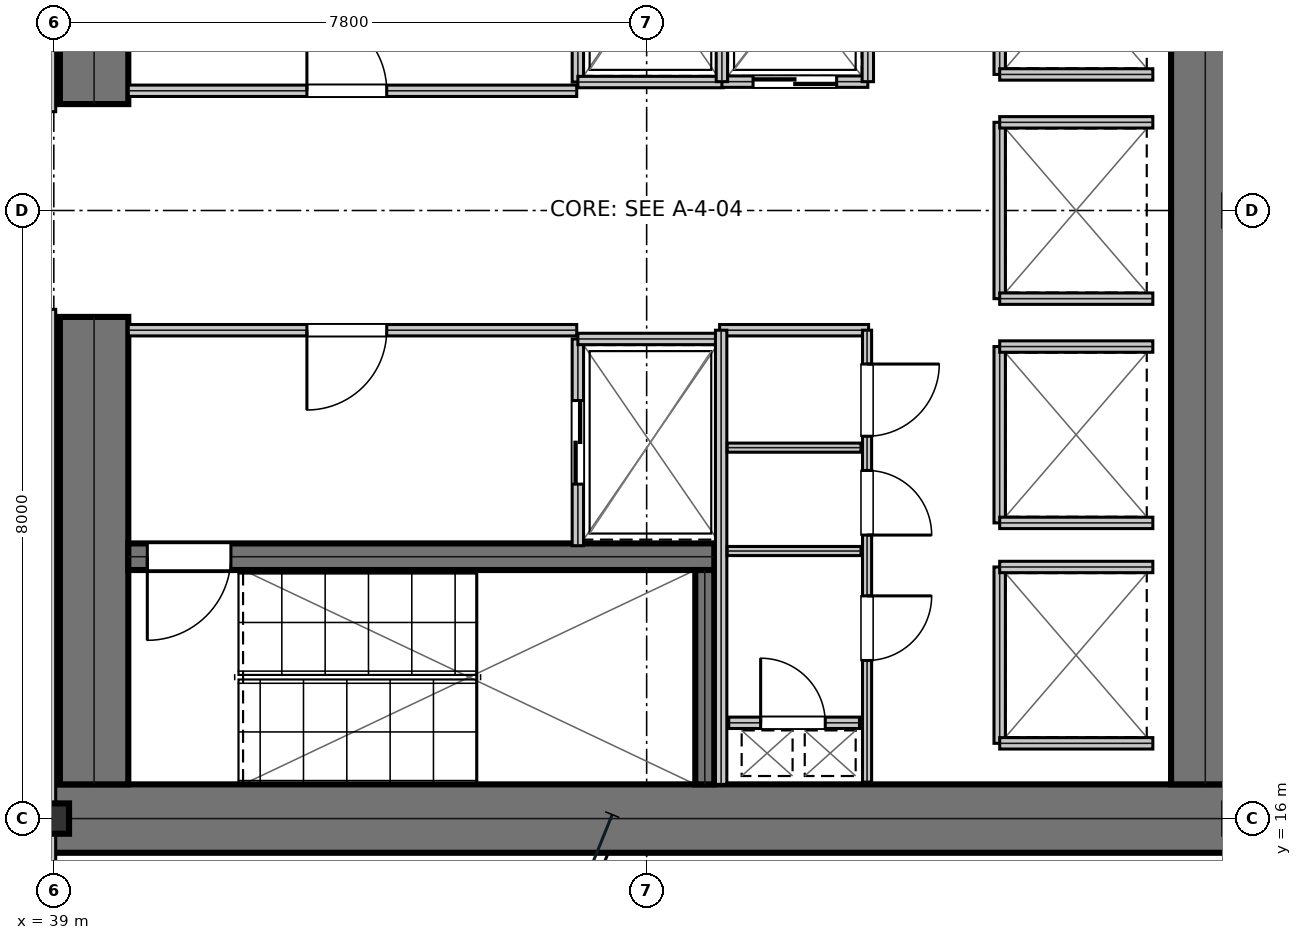
"""IFC4 building model, lengths in metres.
Left out: names, types, materials, properties, quantities, classifications, styles, units other than length and angle.
Written with IfcOpenShell. Run it as: python <this file> out.ifc"""

import sys

from ifc_helpers import new_model, si_unit, direction, frame, frame_2d, origin, origin_2d, place, context, subcontext, project, spatial, rectangle, i_section, extrude, element, fill, save


model = new_model("IFC4")
c1 = context("Model", 3, precision=1e-05, world=origin(), true_north=direction((0.0, 1.0)))
c2 = subcontext(c1, "Body", "Model", "MODEL_VIEW")
j1 = project(units=[si_unit("LENGTHUNIT", "METRE"), si_unit("PLANEANGLEUNIT", "RADIAN")], contexts=[c1])
p1 = place(None, origin())
s1 = spatial("IfcSite", under=j1, at=p1, CompositionType="ELEMENT")
p2 = place(p1, origin())
s2 = spatial("IfcBuilding", under=s1, at=p2, CompositionType="ELEMENT")
p3 = place(p2, frame((0.0, 0.0, 66.15)))
s3 = spatial("IfcBuildingStorey", under=s2, at=p3, CompositionType="ELEMENT", Elevation=66.15)
p4 = place(p3, frame((38.8, 16.0, 0.0), z_axis=(0.0, 0.0, 1.0), x_axis=(1.0, 0.0, 0.0)))
e1 = element("IfcWall", 1, at=p4, inside=s3, PredefinedType="SHEAR", context=c2, shape_type="SweptSolid", body=[
    extrude(rectangle(XDim=16.0, YDim=0.9, at=frame_2d((8.0, 0.0))), origin(), (0.0, 0.0, 1.0), 3.81),
])
for number, where, z_axis, x_axis in (
    (2, (39.53, 16.45, 0.0), (0.0, 0.0, 1.0), (0.0, 1.0, 0.0)),
    (3, (39.53, 25.4, 0.0), (0.0, 0.0, 1.0), (0.0, 1.0, 0.0)),
):
    element("IfcWall", number, at=place(p3, frame(where, z_axis=z_axis, x_axis=x_axis)), inside=s3, PredefinedType="SHEAR", context=c2, shape_type="SweptSolid", body=[
        extrude(rectangle(XDim=6.15, YDim=0.9, at=frame_2d((3.075, 0.0))), origin(), (0.0, 0.0, 1.0), 3.81),
    ])
p5 = place(p3, frame((54.15, 16.45, 0.0), z_axis=(0.0, 0.0, 1.0), x_axis=(0.0, 1.0, 0.0)))
e4 = element("IfcWall", 4, at=p5, inside=s3, PredefinedType="SHEAR", context=c2, shape_type="SweptSolid", body=[
    extrude(rectangle(XDim=15.1, YDim=0.9, at=frame_2d((7.55, 0.0))), origin(), (0.0, 0.0, 1.0), 3.81),
])
p6 = place(p3, frame((39.98, 19.445, 0.0), z_axis=(0.0, 0.0, 1.0), x_axis=(1.0, 0.0, 0.0)))
e5 = element("IfcWall", 5, at=p6, inside=s3, PredefinedType="SHEAR", context=c2, shape_type="SweptSolid", body=[
    extrude(rectangle(XDim=7.71, YDim=0.35, at=frame_2d((3.855, 0.0))), origin(), (0.0, 0.0, 1.0), 3.81),
])
p7 = place(p6, frame((0.25, 0.0, 0.0)))
e6 = element("IfcOpeningElement", 6, at=p7, cuts=e5, PredefinedType="OPENING", context=c2, shape_type="SweptSolid", body=[
    extrude(rectangle(XDim=1.1, YDim=2.15, at=frame_2d((0.55, 1.075))), frame((0.0, 0.185, 0.0), z_axis=(0.0, -1.0, 0.0), x_axis=(1.0, 0.0, 0.0)), (0.0, 0.0, 1.0), 0.37),
])
p8 = place(p3, frame((47.565, 16.45, 0.0), z_axis=(0.0, 0.0, 1.0), x_axis=(0.0, 1.0, 0.0)))
e7 = element("IfcWall", 7, at=p8, inside=s3, PredefinedType="SHEAR", context=c2, shape_type="SweptSolid", body=[
    extrude(rectangle(XDim=2.82, YDim=0.25, at=frame_2d((1.41, 0.0))), origin(), (0.0, 0.0, 1.0), 3.81),
])
p9 = place(p3, frame((39.0, 16.0, 0.0), z_axis=(0.0, 0.0, 1.0), x_axis=(1.0, 0.0, 0.0)))
e8 = element("IfcColumn", 8, at=p9, inside=s3, PredefinedType="COLUMN", context=c2, shape_type="SweptSolid", body=[
    extrude(i_section(OverallWidth=0.401, OverallDepth=0.399, WebThickness=0.025, FlangeThickness=0.04, at=origin_2d()), origin(), (0.0, 0.0, 1.0), 4.044),
])
p10 = place(p3, frame((39.98, 25.575, 0.0), z_axis=(0.0, 0.0, 1.0), x_axis=(1.0, 0.0, 0.0)))
e9 = element("IfcWall", 9, at=p10, inside=s3, PredefinedType="PARTITIONING", context=c2, shape_type="SweptSolid", body=[
    extrude(rectangle(XDim=5.9, YDim=0.15, at=frame_2d((2.95, 0.0))), origin(), (0.0, 0.0, 1.0), 3.81),
])
p11 = place(p10, frame((2.35, 0.0, 0.0)))
e10 = element("IfcOpeningElement", 10, at=p11, cuts=e9, PredefinedType="OPENING", context=c2, shape_type="SweptSolid", body=[
    extrude(rectangle(XDim=1.05, YDim=2.15, at=frame_2d((0.525, 1.075))), frame((0.0, 0.085, 0.0), z_axis=(0.0, -1.0, 0.0), x_axis=(1.0, 0.0, 0.0)), (0.0, 0.0, 1.0), 0.17),
])
p12 = place(p3, frame((39.98, 22.425, 0.0), z_axis=(0.0, 0.0, 1.0), x_axis=(1.0, 0.0, 0.0)))
e11 = element("IfcWall", 11, at=p12, inside=s3, PredefinedType="PARTITIONING", context=c2, shape_type="SweptSolid", body=[
    extrude(rectangle(XDim=5.9, YDim=0.15, at=frame_2d((2.95, 0.0))), origin(), (0.0, 0.0, 1.0), 3.81),
])
p13 = place(p12, frame((2.35, 0.0, 0.0)))
e12 = element("IfcOpeningElement", 12, at=p13, cuts=e11, PredefinedType="OPENING", context=c2, shape_type="SweptSolid", body=[
    extrude(rectangle(XDim=1.05, YDim=2.15, at=frame_2d((0.525, 1.075))), frame((0.0, 0.085, 0.0), z_axis=(0.0, -1.0, 0.0), x_axis=(1.0, 0.0, 0.0)), (0.0, 0.0, 1.0), 0.17),
])
p14 = place(p3, frame((45.895, 25.69, 0.0), z_axis=(0.0, 0.0, 1.0), x_axis=(0.0, 1.0, 0.0)))
e13 = element("IfcWall", 13, at=p14, inside=s3, PredefinedType="PARTITIONING", context=c2, shape_type="SweptSolid", body=[
    extrude(rectangle(XDim=2.72, YDim=0.15, at=frame_2d((1.36, 0.0))), origin(), (0.0, 0.0, 1.0), 3.81),
])
p15 = place(p14, frame((0.81, 0.0, 0.0)))
e14 = element("IfcOpeningElement", 14, at=p15, cuts=e13, PredefinedType="OPENING", context=c2, shape_type="SweptSolid", body=[
    extrude(rectangle(XDim=1.1, YDim=2.15, at=frame_2d((0.55, 1.075))), frame((0.0, 0.085, 0.0), z_axis=(0.0, -1.0, 0.0), x_axis=(1.0, 0.0, 0.0)), (0.0, 0.0, 1.0), 0.17),
])
p16 = place(p3, frame((45.895, 25.69, 0.0), z_axis=(0.0, 0.0, 1.0), x_axis=(1.0, 0.0, 0.0)))
e15 = element("IfcWall", 15, at=p16, inside=s3, PredefinedType="PARTITIONING", context=c2, shape_type="SweptSolid", body=[
    extrude(rectangle(XDim=1.915, YDim=0.15, at=frame_2d((0.958, 0.0))), origin(), (0.0, 0.0, 1.0), 3.81),
])
p17 = place(p3, frame((45.895, 19.59, 0.0), z_axis=(0.0, 0.0, 1.0), x_axis=(0.0, 1.0, 0.0)))
e16 = element("IfcWall", 16, at=p17, inside=s3, PredefinedType="PARTITIONING", context=c2, shape_type="SweptSolid", body=[
    extrude(rectangle(XDim=2.72, YDim=0.15, at=frame_2d((1.36, 0.0))), origin(), (0.0, 0.0, 1.0), 3.81),
])
p18 = place(p17, frame((0.81, 0.0, 0.0)))
e17 = element("IfcOpeningElement", 17, at=p18, cuts=e16, PredefinedType="OPENING", context=c2, shape_type="SweptSolid", body=[
    extrude(rectangle(XDim=1.1, YDim=2.15, at=frame_2d((0.55, 1.075))), frame((0.0, 0.085, 0.0), z_axis=(0.0, -1.0, 0.0), x_axis=(1.0, 0.0, 0.0)), (0.0, 0.0, 1.0), 0.17),
])
p19 = place(p3, frame((45.895, 22.31, 0.0), z_axis=(0.0, 0.0, 1.0), x_axis=(1.0, 0.0, 0.0)))
e18 = element("IfcWall", 18, at=p19, inside=s3, PredefinedType="PARTITIONING", context=c2, shape_type="SweptSolid", body=[
    extrude(rectangle(XDim=1.915, YDim=0.15, at=frame_2d((0.958, 0.0))), origin(), (0.0, 0.0, 1.0), 3.81),
])
p20 = place(p3, frame((47.79, 25.695, 0.0), z_axis=(0.0, 0.0, 1.0), x_axis=(1.0, 0.0, 0.0)))
e19 = element("IfcWall", 19, at=p20, inside=s3, PredefinedType="PARTITIONING", context=c2, shape_type="SweptSolid", body=[
    extrude(rectangle(XDim=1.92, YDim=0.15, at=frame_2d((0.96, 0.0))), origin(), (0.0, 0.0, 1.0), 3.81),
])
p21 = place(p20, frame((0.41, 0.0, 0.0)))
e20 = element("IfcOpeningElement", 20, at=p21, cuts=e19, PredefinedType="OPENING", context=c2, shape_type="SweptSolid", body=[
    extrude(rectangle(XDim=1.1, YDim=2.15, at=frame_2d((0.55, 1.075))), frame((0.0, 0.085, 0.0), z_axis=(0.0, -1.0, 0.0), x_axis=(1.0, 0.0, 0.0)), (0.0, 0.0, 1.0), 0.17),
])
for number, where, z_axis, x_axis in (
    (21, (47.79, 25.695, 0.0), (0.0, 0.0, 1.0), (0.0, 1.0, 0.0)),
    (22, (49.71, 25.695, 0.0), (0.0, 0.0, 1.0), (0.0, 1.0, 0.0)),
):
    element("IfcWall", number, at=place(p3, frame(where, z_axis=z_axis, x_axis=x_axis)), inside=s3, PredefinedType="PARTITIONING", context=c2, shape_type="SweptSolid", body=[
        extrude(rectangle(XDim=2.415, YDim=0.15, at=frame_2d((1.208, 0.0))), origin(), (0.0, 0.0, 1.0), 3.81),
    ])
p22 = place(p3, frame((51.445, 25.79, 0.0), z_axis=(0.0, 0.0, 1.0), x_axis=(0.0, 1.0, 0.0)))
e23 = element("IfcWall", 23, at=p22, inside=s3, PredefinedType="PARTITIONING", context=c2, shape_type="SweptSolid", body=[
    extrude(rectangle(XDim=2.32, YDim=0.15, at=frame_2d((1.16, 0.0))), origin(), (0.0, 0.0, 1.0), 3.81),
])
p23 = place(p3, frame((51.445, 25.79, 0.0), z_axis=(0.0, 0.0, 1.0), x_axis=(1.0, 0.0, 0.0)))
e24 = element("IfcWall", 24, at=p23, inside=s3, PredefinedType="PARTITIONING", context=c2, shape_type="SweptSolid", body=[
    extrude(rectangle(XDim=2.015, YDim=0.15, at=frame_2d((1.007, 0.0))), origin(), (0.0, 0.0, 1.0), 3.81),
])
p24 = place(p3, frame((51.445, 19.89, 0.0), z_axis=(0.0, 0.0, 1.0), x_axis=(0.0, 1.0, 0.0)))
e25 = element("IfcWall", 25, at=p24, inside=s3, PredefinedType="PARTITIONING", context=c2, shape_type="SweptSolid", body=[
    extrude(rectangle(XDim=2.32, YDim=0.15, at=frame_2d((1.16, 0.0))), origin(), (0.0, 0.0, 1.0), 3.81),
])
for number, where, z_axis, x_axis in (
    (26, (51.445, 19.89, 0.0), (0.0, 0.0, 1.0), (1.0, 0.0, 0.0)),
    (27, (51.445, 22.21, 0.0), (0.0, 0.0, 1.0), (1.0, 0.0, 0.0)),
):
    element("IfcWall", number, at=place(p3, frame(where, z_axis=z_axis, x_axis=x_axis)), inside=s3, PredefinedType="PARTITIONING", context=c2, shape_type="SweptSolid", body=[
        extrude(rectangle(XDim=2.015, YDim=0.15, at=frame_2d((1.007, 0.0))), origin(), (0.0, 0.0, 1.0), 3.81),
    ])
p25 = place(p3, frame((51.445, 22.84, 0.0), z_axis=(0.0, 0.0, 1.0), x_axis=(0.0, 1.0, 0.0)))
e28 = element("IfcWall", 28, at=p25, inside=s3, PredefinedType="PARTITIONING", context=c2, shape_type="SweptSolid", body=[
    extrude(rectangle(XDim=2.32, YDim=0.15, at=frame_2d((1.16, 0.0))), origin(), (0.0, 0.0, 1.0), 3.81),
])
for number, where, z_axis, x_axis in (
    (29, (51.445, 22.84, 0.0), (0.0, 0.0, 1.0), (1.0, 0.0, 0.0)),
    (30, (51.445, 25.16, 0.0), (0.0, 0.0, 1.0), (1.0, 0.0, 0.0)),
):
    element("IfcWall", number, at=place(p3, frame(where, z_axis=z_axis, x_axis=x_axis)), inside=s3, PredefinedType="PARTITIONING", context=c2, shape_type="SweptSolid", body=[
        extrude(rectangle(XDim=2.015, YDim=0.15, at=frame_2d((1.007, 0.0))), origin(), (0.0, 0.0, 1.0), 3.81),
    ])
p26 = place(p3, frame((51.445, 16.99, 0.0), z_axis=(0.0, 0.0, 1.0), x_axis=(0.0, 1.0, 0.0)))
e31 = element("IfcWall", 31, at=p26, inside=s3, PredefinedType="PARTITIONING", context=c2, shape_type="SweptSolid", body=[
    extrude(rectangle(XDim=2.32, YDim=0.15, at=frame_2d((1.16, 0.0))), origin(), (0.0, 0.0, 1.0), 3.81),
])
for number, where, z_axis, x_axis in (
    (32, (51.445, 16.99, 0.0), (0.0, 0.0, 1.0), (1.0, 0.0, 0.0)),
    (33, (51.445, 19.31, 0.0), (0.0, 0.0, 1.0), (1.0, 0.0, 0.0)),
):
    element("IfcWall", number, at=place(p3, frame(where, z_axis=z_axis, x_axis=x_axis)), inside=s3, PredefinedType="PARTITIONING", context=c2, shape_type="SweptSolid", body=[
        extrude(rectangle(XDim=2.015, YDim=0.15, at=frame_2d((1.007, 0.0))), origin(), (0.0, 0.0, 1.0), 3.81),
    ])
p27 = place(p3, frame((47.88, 17.26, 0.0), z_axis=(0.0, 0.0, 1.0), x_axis=(1.0, 0.0, 0.0)))
e34 = element("IfcWall", 34, at=p27, inside=s3, PredefinedType="PARTITIONING", context=c2, shape_type="SweptSolid", body=[
    extrude(rectangle(XDim=1.72, YDim=0.15, at=frame_2d((0.86, 0.0))), origin(), (0.0, 0.0, 1.0), 3.81),
])
p28 = place(p27, frame((0.42, 0.0, 0.0)))
e35 = element("IfcOpeningElement", 35, at=p28, cuts=e34, PredefinedType="OPENING", context=c2, shape_type="SweptSolid", body=[
    extrude(rectangle(XDim=0.85, YDim=2.15, at=frame_2d((0.425, 1.075))), frame((0.0, 0.085, 0.0), z_axis=(0.0, -1.0, 0.0), x_axis=(1.0, 0.0, 0.0)), (0.0, 0.0, 1.0), 0.17),
])
p29 = place(p3, frame((47.76, 22.425, 0.0), z_axis=(0.0, 0.0, 1.0), x_axis=(1.0, 0.0, 0.0)))
e36 = element("IfcWall", 36, at=p29, inside=s3, PredefinedType="PARTITIONING", context=c2, shape_type="SweptSolid", body=[
    extrude(rectangle(XDim=1.96, YDim=0.15, at=frame_2d((0.98, 0.0))), origin(), (0.0, 0.0, 1.0), 3.81),
])
p30 = place(p3, frame((47.78, 16.45, 0.0), z_axis=(0.0, 0.0, 1.0), x_axis=(0.0, 1.0, 0.0)))
e37 = element("IfcWall", 37, at=p30, inside=s3, PredefinedType="PARTITIONING", context=c2, shape_type="SweptSolid", body=[
    extrude(rectangle(XDim=5.975, YDim=0.15, at=frame_2d((2.988, 0.0))), origin(), (0.0, 0.0, 1.0), 3.81),
])
for number, where, z_axis, x_axis in (
    (38, (47.86, 19.52, 0.0), (0.0, 0.0, 1.0), (1.0, 0.0, 0.0)),
    (39, (47.86, 20.88, 0.0), (0.0, 0.0, 1.0), (1.0, 0.0, 0.0)),
):
    element("IfcWall", number, at=place(p3, frame(where, z_axis=z_axis, x_axis=x_axis)), inside=s3, PredefinedType="PARTITIONING", context=c2, shape_type="SweptSolid", body=[
        extrude(rectangle(XDim=1.76, YDim=0.12, at=frame_2d((0.88, 0.0))), origin(), (0.0, 0.0, 1.0), 3.81),
    ])
p31 = place(p3, frame((49.7, 16.48, 0.0), z_axis=(0.0, 0.0, 1.0), x_axis=(0.0, 1.0, 0.0)))
e40 = element("IfcWall", 40, at=p31, inside=s3, PredefinedType="PARTITIONING", context=c2, shape_type="SweptSolid", body=[
    extrude(rectangle(XDim=5.945, YDim=0.12, at=frame_2d((2.973, 0.0))), origin(), (0.0, 0.0, 1.0), 3.81),
])
p32 = place(p31, frame((1.6, 0.0, 0.0)))
e41 = element("IfcOpeningElement", 41, at=p32, cuts=e40, PredefinedType="OPENING", context=c2, shape_type="SweptSolid", body=[
    extrude(rectangle(XDim=0.85, YDim=2.15, at=frame_2d((0.425, 1.075))), frame((0.0, 0.07, 0.0), z_axis=(0.0, -1.0, 0.0), x_axis=(1.0, 0.0, 0.0)), (0.0, 0.0, 1.0), 0.14),
])
p33 = place(p31, frame((3.25, 0.0, 0.0)))
e42 = element("IfcOpeningElement", 42, at=p33, cuts=e40, PredefinedType="OPENING", context=c2, shape_type="SweptSolid", body=[
    extrude(rectangle(XDim=0.85, YDim=2.15, at=frame_2d((0.425, 1.075))), frame((0.0, 0.07, 0.0), z_axis=(0.0, -1.0, 0.0), x_axis=(1.0, 0.0, 0.0)), (0.0, 0.0, 1.0), 0.14),
])
p34 = place(p31, frame((4.55, 0.0, 0.0)))
e43 = element("IfcOpeningElement", 43, at=p34, cuts=e40, PredefinedType="OPENING", context=c2, shape_type="SweptSolid", body=[
    extrude(rectangle(XDim=0.95, YDim=2.15, at=frame_2d((0.475, 1.075))), frame((0.0, 0.07, 0.0), z_axis=(0.0, -1.0, 0.0), x_axis=(1.0, 0.0, 0.0)), (0.0, 0.0, 1.0), 0.14),
])
for number, where, z_axis, x_axis in (
    (44, (38.95, 14.5, 0.0), (0.0, 0.0, 1.0), (0.0, 1.0, 0.0)),
    (45, (38.95, 25.3, 0.0), (0.0, 0.0, 1.0), (0.0, 1.0, 0.0)),
):
    element("IfcWall", number, at=place(p3, frame(where, z_axis=z_axis, x_axis=x_axis)), inside=s3, PredefinedType="PARTITIONING", context=c2, shape_type="SweptSolid", body=[
        extrude(rectangle(XDim=8.2, YDim=0.15, at=frame_2d((4.1, 0.0))), origin(), (0.0, 0.0, 1.0), 3.181),
    ])
p35 = place(p11, origin())
e46 = element("IfcDoor", 46, at=p35, inside=s3, OperationType="SINGLE_SWING_LEFT", PredefinedType="DOOR", context=c2, shape_type="SweptSolid", body=[
    extrude(rectangle(XDim=1.05, YDim=2.15, at=frame_2d((0.525, 1.075))), frame((0.0, 0.025, 0.0), z_axis=(0.0, -1.0, 0.0), x_axis=(1.0, 0.0, 0.0)), (0.0, 0.0, 1.0), 0.05),
])
fill(e10, e46)
p36 = place(p13, frame((1.05, 0.0, 0.0), z_axis=(0.0, 0.0, 1.0), x_axis=(-1.0, 0.0, 0.0)))
e47 = element("IfcDoor", 47, at=p36, inside=s3, OperationType="SINGLE_SWING_RIGHT", PredefinedType="DOOR", context=c2, shape_type="SweptSolid", body=[
    extrude(rectangle(XDim=1.05, YDim=2.15, at=frame_2d((0.525, 1.075))), frame((0.0, 0.025, 0.0), z_axis=(0.0, -1.0, 0.0), x_axis=(1.0, 0.0, 0.0)), (0.0, 0.0, 1.0), 0.05),
])
fill(e12, e47)
p37 = place(p18, frame((1.1, 0.0, 0.0), z_axis=(0.0, 0.0, 1.0), x_axis=(-1.0, 0.0, 0.0)))
e48 = element("IfcDoor", 48, at=p37, inside=s3, OperationType="DOUBLE_DOOR_SLIDING", PredefinedType="DOOR", context=c2, shape_type="SweptSolid", body=[
    extrude(rectangle(XDim=1.1, YDim=2.15, at=frame_2d((0.55, 1.075))), frame((0.0, 0.025, 0.0), z_axis=(0.0, -1.0, 0.0), x_axis=(1.0, 0.0, 0.0)), (0.0, 0.0, 1.0), 0.05),
])
fill(e17, e48)
p38 = place(p21, frame((1.1, 0.0, 0.0), z_axis=(0.0, 0.0, 1.0), x_axis=(-1.0, 0.0, 0.0)))
e49 = element("IfcDoor", 49, at=p38, inside=s3, OperationType="DOUBLE_DOOR_SLIDING", PredefinedType="DOOR", context=c2, shape_type="SweptSolid", body=[
    extrude(rectangle(XDim=1.1, YDim=2.15, at=frame_2d((0.55, 1.075))), frame((0.0, 0.025, 0.0), z_axis=(0.0, -1.0, 0.0), x_axis=(1.0, 0.0, 0.0)), (0.0, 0.0, 1.0), 0.05),
])
fill(e20, e49)
p39 = place(p28, origin())
e50 = element("IfcDoor", 50, at=p39, inside=s3, OperationType="SINGLE_SWING_LEFT", PredefinedType="TRAPDOOR", context=c2, shape_type="SweptSolid", body=[
    extrude(rectangle(XDim=0.85, YDim=2.15, at=frame_2d((0.425, 1.075))), frame((0.0, 0.025, 0.0), z_axis=(0.0, -1.0, 0.0), x_axis=(1.0, 0.0, 0.0)), (0.0, 0.0, 1.0), 0.05),
])
fill(e35, e50)
p40 = place(p32, frame((0.85, 0.0, 0.0), z_axis=(0.0, 0.0, 1.0), x_axis=(-1.0, 0.0, 0.0)))
e51 = element("IfcDoor", 51, at=p40, inside=s3, OperationType="SINGLE_SWING_LEFT", PredefinedType="DOOR", context=c2, shape_type="SweptSolid", body=[
    extrude(rectangle(XDim=0.85, YDim=2.15, at=frame_2d((0.425, 1.075))), frame((0.0, 0.025, 0.0), z_axis=(0.0, -1.0, 0.0), x_axis=(1.0, 0.0, 0.0)), (0.0, 0.0, 1.0), 0.05),
])
fill(e41, e51)
p41 = place(p33, frame((0.85, 0.0, 0.0), z_axis=(0.0, 0.0, 1.0), x_axis=(-1.0, 0.0, 0.0)))
e52 = element("IfcDoor", 52, at=p41, inside=s3, OperationType="SINGLE_SWING_RIGHT", PredefinedType="DOOR", context=c2, shape_type="SweptSolid", body=[
    extrude(rectangle(XDim=0.85, YDim=2.15, at=frame_2d((0.425, 1.075))), frame((0.0, 0.025, 0.0), z_axis=(0.0, -1.0, 0.0), x_axis=(1.0, 0.0, 0.0)), (0.0, 0.0, 1.0), 0.05),
])
fill(e42, e52)
p42 = place(p34, frame((0.95, 0.0, 0.0), z_axis=(0.0, 0.0, 1.0), x_axis=(-1.0, 0.0, 0.0)))
e53 = element("IfcDoor", 53, at=p42, inside=s3, OperationType="SINGLE_SWING_LEFT", PredefinedType="DOOR", context=c2, shape_type="SweptSolid", body=[
    extrude(rectangle(XDim=0.95, YDim=2.15, at=frame_2d((0.475, 1.075))), frame((0.0, 0.025, 0.0), z_axis=(0.0, -1.0, 0.0), x_axis=(1.0, 0.0, 0.0)), (0.0, 0.0, 1.0), 0.05),
])
fill(e43, e53)
p43 = place(p7, frame((1.1, 0.0, 0.0), z_axis=(0.0, 0.0, 1.0), x_axis=(-1.0, 0.0, 0.0)))
e54 = element("IfcDoor", 54, at=p43, inside=s3, OperationType="SINGLE_SWING_RIGHT", PredefinedType="DOOR", context=c2, shape_type="SweptSolid", body=[
    extrude(rectangle(XDim=1.1, YDim=2.15, at=frame_2d((0.55, 1.075))), frame((0.0, 0.025, 0.0), z_axis=(0.0, -1.0, 0.0), x_axis=(1.0, 0.0, 0.0)), (0.0, 0.0, 1.0), 0.05),
])
fill(e6, e54)
save(model, sys.argv[1])
